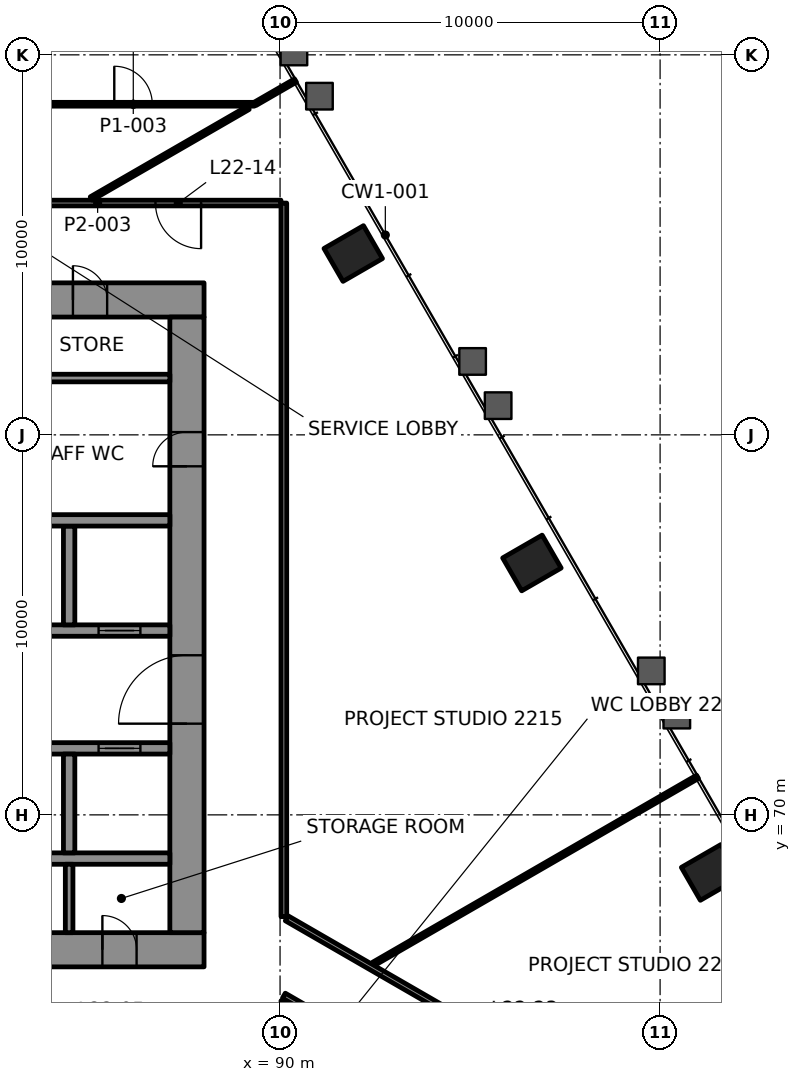
"""IFC4 building model, lengths in metres.
Left out: names, types, materials, properties, quantities, classifications, styles, units other than length and angle.
Written with IfcOpenShell. Run it as: python <this file> out.ifc"""

import sys

from ifc_helpers import new_model, si_unit, direction, frame, frame_2d, origin, origin_2d, place, context, subcontext, project, spatial, rectangle, extrude, element, fill, save


model = new_model("IFC4")
c1 = context("Model", 3, precision=1e-05, world=origin(), true_north=direction((0.0, 1.0)))
c2 = subcontext(c1, "Body", "Model", "MODEL_VIEW")
j1 = project(units=[si_unit("LENGTHUNIT", "METRE"), si_unit("PLANEANGLEUNIT", "RADIAN")], contexts=[c1])
p1 = place(None, origin())
s1 = spatial("IfcSite", under=j1, at=p1, CompositionType="ELEMENT")
p2 = place(p1, origin())
s2 = spatial("IfcBuilding", under=s1, at=p2, CompositionType="ELEMENT")
p3 = place(p2, frame((0.0, 0.0, 98.8)))
s3 = spatial("IfcBuildingStorey", under=s2, at=p3, CompositionType="ELEMENT", Elevation=98.8)
for number, where, z_axis, x_axis in (
    (1, (101.329, 68.485, -0.0), (0.0, 0.0, 1.0), (-0.5, 0.866, 0.0)),
    (2, (96.627, 76.628, -0.0), (0.0, 0.0, 1.0), (-0.5, 0.866, 0.0)),
    (3, (91.926, 84.772, -0.0), (0.0, 0.0, 1.0), (-0.5, 0.866, 0.0)),
):
    element("IfcColumn", number, at=place(p3, frame(where, z_axis=z_axis, x_axis=x_axis)), inside=s3, PredefinedType="COLUMN", context=c2, shape_type="SweptSolid", body=[
        extrude(rectangle(XDim=1.0, YDim=1.2, at=origin_2d()), origin(), (0.0, 0.0, 1.0), 4.2),
    ])
p4 = place(p3, frame((62.0, 66.45, 0.0), z_axis=(0.0, 0.0, 1.0), x_axis=(1.0, 0.0, 0.0)))
e4 = element("IfcWall", 4, at=p4, inside=s3, PredefinedType="SHEAR", context=c2, shape_type="SweptSolid", body=[
    extrude(rectangle(XDim=26.0, YDim=0.9, at=frame_2d((13.0, 0.0))), origin(), (0.0, 0.0, 1.0), 4.0),
])
p5 = place(p4, frame((3.45, 0.0, 0.0)))
e5 = element("IfcOpeningElement", 5, at=p5, cuts=e4, PredefinedType="OPENING", context=c2, shape_type="SweptSolid", body=[
    extrude(rectangle(XDim=0.9, YDim=2.1, at=frame_2d((0.45, 1.05))), frame((0.0, 0.46, 0.0), z_axis=(0.0, -1.0, 0.0), x_axis=(1.0, 0.0, 0.0)), (0.0, 0.0, 1.0), 0.92),
])
p6 = place(p4, frame((6.425, 0.0, 0.0)))
e6 = element("IfcOpeningElement", 6, at=p6, cuts=e4, PredefinedType="OPENING", context=c2, shape_type="SweptSolid", body=[
    extrude(rectangle(XDim=0.9, YDim=2.1, at=frame_2d((0.45, 1.05))), frame((0.0, 0.46, 0.0), z_axis=(0.0, -1.0, 0.0), x_axis=(1.0, 0.0, 0.0)), (0.0, 0.0, 1.0), 0.92),
])
p7 = place(p4, frame((11.5, 0.0, 0.0)))
e7 = element("IfcOpeningElement", 7, at=p7, cuts=e4, PredefinedType="OPENING", context=c2, shape_type="SweptSolid", body=[
    extrude(rectangle(XDim=0.9, YDim=2.1, at=frame_2d((0.45, 1.05))), frame((0.0, 0.46, 0.0), z_axis=(0.0, -1.0, 0.0), x_axis=(1.0, 0.0, 0.0)), (0.0, 0.0, 1.0), 0.92),
])
p8 = place(p4, frame((18.5, 0.0, 0.0)))
e8 = element("IfcOpeningElement", 8, at=p8, cuts=e4, PredefinedType="OPENING", context=c2, shape_type="SweptSolid", body=[
    extrude(rectangle(XDim=0.9, YDim=2.1, at=frame_2d((0.45, 1.05))), frame((0.0, 0.46, 0.0), z_axis=(0.0, -1.0, 0.0), x_axis=(1.0, 0.0, 0.0)), (0.0, 0.0, 1.0), 0.92),
])
p9 = place(p4, frame((23.325, 0.0, 0.0)))
e9 = element("IfcOpeningElement", 9, at=p9, cuts=e4, PredefinedType="OPENING", context=c2, shape_type="SweptSolid", body=[
    extrude(rectangle(XDim=0.9, YDim=2.1, at=frame_2d((0.45, 1.05))), frame((0.0, 0.46, 0.0), z_axis=(0.0, -1.0, 0.0), x_axis=(1.0, 0.0, 0.0)), (0.0, 0.0, 1.0), 0.92),
])
p10 = place(p3, frame((62.0, 83.55, 0.0), z_axis=(0.0, 0.0, 1.0), x_axis=(1.0, 0.0, 0.0)))
e10 = element("IfcWall", 10, at=p10, inside=s3, PredefinedType="SHEAR", context=c2, shape_type="SweptSolid", body=[
    extrude(rectangle(XDim=26.0, YDim=0.9, at=frame_2d((13.0, 0.0))), origin(), (0.0, 0.0, 1.0), 4.0),
])
p11 = place(p10, frame((5.695, 0.0, 0.0)))
e11 = element("IfcOpeningElement", 11, at=p11, cuts=e10, PredefinedType="OPENING", context=c2, shape_type="SweptSolid", body=[
    extrude(rectangle(XDim=1.0, YDim=2.1, at=frame_2d((0.5, 1.05))), frame((0.0, 0.46, 0.0), z_axis=(0.0, -1.0, 0.0), x_axis=(1.0, 0.0, 0.0)), (0.0, 0.0, 1.0), 0.92),
])
p12 = place(p10, frame((19.505, 0.0, 0.0)))
e12 = element("IfcOpeningElement", 12, at=p12, cuts=e10, PredefinedType="OPENING", context=c2, shape_type="SweptSolid", body=[
    extrude(rectangle(XDim=1.0, YDim=2.1, at=frame_2d((0.5, 1.05))), frame((0.0, 0.46, 0.0), z_axis=(0.0, -1.0, 0.0), x_axis=(1.0, 0.0, 0.0)), (0.0, 0.0, 1.0), 0.92),
])
p13 = place(p10, frame((3.45, 0.0, 0.0)))
e13 = element("IfcOpeningElement", 13, at=p13, cuts=e10, PredefinedType="OPENING", context=c2, shape_type="SweptSolid", body=[
    extrude(rectangle(XDim=0.9, YDim=2.1, at=frame_2d((0.45, 1.05))), frame((0.0, 0.46, 0.0), z_axis=(0.0, -1.0, 0.0), x_axis=(1.0, 0.0, 0.0)), (0.0, 0.0, 1.0), 0.92),
])
p14 = place(p10, frame((12.65, 0.0, 0.0)))
e14 = element("IfcOpeningElement", 14, at=p14, cuts=e10, PredefinedType="OPENING", context=c2, shape_type="SweptSolid", body=[
    extrude(rectangle(XDim=0.9, YDim=2.1, at=frame_2d((0.45, 1.05))), frame((0.0, 0.46, 0.0), z_axis=(0.0, -1.0, 0.0), x_axis=(1.0, 0.0, 0.0)), (0.0, 0.0, 1.0), 0.92),
])
p15 = place(p10, frame((22.55, 0.0, 0.0)))
e15 = element("IfcOpeningElement", 15, at=p15, cuts=e10, PredefinedType="OPENING", context=c2, shape_type="SweptSolid", body=[
    extrude(rectangle(XDim=0.9, YDim=2.1, at=frame_2d((0.45, 1.05))), frame((0.0, 0.46, 0.0), z_axis=(0.0, -1.0, 0.0), x_axis=(1.0, 0.0, 0.0)), (0.0, 0.0, 1.0), 0.92),
])
p16 = place(p3, frame((87.55, 66.9, 0.0), z_axis=(0.0, 0.0, 1.0), x_axis=(0.0, 1.0, 0.0)))
e16 = element("IfcWall", 16, at=p16, inside=s3, PredefinedType="SHEAR", context=c2, shape_type="SweptSolid", body=[
    extrude(rectangle(XDim=16.2, YDim=0.9, at=frame_2d((8.1, 0.0))), origin(), (0.0, 0.0, 1.0), 4.0),
])
p17 = place(p16, frame((5.5, 0.0, 0.0)))
e17 = element("IfcOpeningElement", 17, at=p17, cuts=e16, PredefinedType="OPENING", context=c2, shape_type="SweptSolid", body=[
    extrude(rectangle(XDim=1.8, YDim=2.1, at=frame_2d((0.9, 1.05))), frame((0.0, 0.46, 0.0), z_axis=(0.0, -1.0, 0.0), x_axis=(1.0, 0.0, 0.0)), (0.0, 0.0, 1.0), 0.92),
])
p18 = place(p16, frame((12.272, 0.0, 0.0)))
e18 = element("IfcOpeningElement", 18, at=p18, cuts=e16, PredefinedType="OPENING", context=c2, shape_type="SweptSolid", body=[
    extrude(rectangle(XDim=0.9, YDim=2.1, at=frame_2d((0.45, 1.05))), frame((0.0, 0.46, 0.0), z_axis=(0.0, -1.0, 0.0), x_axis=(1.0, 0.0, 0.0)), (0.0, 0.0, 1.0), 0.92),
])
p19 = place(p3, frame((70.35, 68.85, 0.0), z_axis=(0.0, 0.0, 1.0), x_axis=(1.0, 0.0, 0.0)))
e19 = element("IfcWall", 19, at=p19, inside=s3, PredefinedType="SHEAR", context=c2, shape_type="SweptSolid", body=[
    extrude(rectangle(XDim=16.75, YDim=0.3, at=frame_2d((8.375, 0.0))), origin(), (0.0, 0.0, 1.0), 4.0),
])
p20 = place(p3, frame((70.3, 71.75, 0.0), z_axis=(0.0, 0.0, 1.0), x_axis=(1.0, 0.0, 0.0)))
e20 = element("IfcWall", 20, at=p20, inside=s3, PredefinedType="SHEAR", context=c2, shape_type="SweptSolid", body=[
    extrude(rectangle(XDim=16.8, YDim=0.3, at=frame_2d((8.4, 0.0))), origin(), (0.0, 0.0, 1.0), 4.0),
])
p21 = place(p20, frame((1.0, 0.0, 0.0)))
e21 = element("IfcOpeningElement", 21, at=p21, cuts=e20, PredefinedType="OPENING", context=c2, shape_type="SweptSolid", body=[
    extrude(rectangle(XDim=1.1, YDim=2.1, at=frame_2d((0.55, 1.05))), frame((0.0, 0.16, 0.0), z_axis=(0.0, -1.0, 0.0), x_axis=(1.0, 0.0, 0.0)), (0.0, 0.0, 1.0), 0.32),
])
p22 = place(p20, frame((3.8, 0.0, 0.0)))
e22 = element("IfcOpeningElement", 22, at=p22, cuts=e20, PredefinedType="OPENING", context=c2, shape_type="SweptSolid", body=[
    extrude(rectangle(XDim=1.1, YDim=2.1, at=frame_2d((0.55, 1.05))), frame((0.0, 0.16, 0.0), z_axis=(0.0, -1.0, 0.0), x_axis=(1.0, 0.0, 0.0)), (0.0, 0.0, 1.0), 0.32),
])
p23 = place(p20, frame((6.6, 0.0, 0.0)))
e23 = element("IfcOpeningElement", 23, at=p23, cuts=e20, PredefinedType="OPENING", context=c2, shape_type="SweptSolid", body=[
    extrude(rectangle(XDim=1.1, YDim=2.1, at=frame_2d((0.55, 1.05))), frame((0.0, 0.16, 0.0), z_axis=(0.0, -1.0, 0.0), x_axis=(1.0, 0.0, 0.0)), (0.0, 0.0, 1.0), 0.32),
])
p24 = place(p20, frame((9.4, 0.0, 0.0)))
e24 = element("IfcOpeningElement", 24, at=p24, cuts=e20, PredefinedType="OPENING", context=c2, shape_type="SweptSolid", body=[
    extrude(rectangle(XDim=1.1, YDim=2.1, at=frame_2d((0.55, 1.05))), frame((0.0, 0.16, 0.0), z_axis=(0.0, -1.0, 0.0), x_axis=(1.0, 0.0, 0.0)), (0.0, 0.0, 1.0), 0.32),
])
p25 = place(p20, frame((12.2, 0.0, 0.0)))
e25 = element("IfcOpeningElement", 25, at=p25, cuts=e20, PredefinedType="OPENING", context=c2, shape_type="SweptSolid", body=[
    extrude(rectangle(XDim=1.1, YDim=2.1, at=frame_2d((0.55, 1.05))), frame((0.0, 0.16, 0.0), z_axis=(0.0, -1.0, 0.0), x_axis=(1.0, 0.0, 0.0)), (0.0, 0.0, 1.0), 0.32),
])
p26 = place(p20, frame((14.925, 0.0, 0.0)))
e26 = element("IfcOpeningElement", 26, at=p26, cuts=e20, PredefinedType="OPENING", context=c2, shape_type="SweptSolid", body=[
    extrude(rectangle(XDim=1.1, YDim=2.1, at=frame_2d((0.55, 1.05))), frame((0.0, 0.16, 0.0), z_axis=(0.0, -1.0, 0.0), x_axis=(1.0, 0.0, 0.0)), (0.0, 0.0, 1.0), 0.32),
])
p27 = place(p3, frame((70.3, 74.85, 0.0), z_axis=(0.0, 0.0, 1.0), x_axis=(1.0, 0.0, 0.0)))
e27 = element("IfcWall", 27, at=p27, inside=s3, PredefinedType="SHEAR", context=c2, shape_type="SweptSolid", body=[
    extrude(rectangle(XDim=16.8, YDim=0.3, at=frame_2d((8.4, 0.0))), origin(), (0.0, 0.0, 1.0), 4.0),
])
p28 = place(p27, frame((3.8, 0.0, 0.0)))
e28 = element("IfcOpeningElement", 28, at=p28, cuts=e27, PredefinedType="OPENING", context=c2, shape_type="SweptSolid", body=[
    extrude(rectangle(XDim=1.1, YDim=2.1, at=frame_2d((0.55, 1.05))), frame((0.0, 0.16, 0.0), z_axis=(0.0, -1.0, 0.0), x_axis=(1.0, 0.0, 0.0)), (0.0, 0.0, 1.0), 0.32),
])
p29 = place(p27, frame((12.2, 0.0, 0.0)))
e29 = element("IfcOpeningElement", 29, at=p29, cuts=e27, PredefinedType="OPENING", context=c2, shape_type="SweptSolid", body=[
    extrude(rectangle(XDim=1.1, YDim=2.1, at=frame_2d((0.55, 1.05))), frame((0.0, 0.16, 0.0), z_axis=(0.0, -1.0, 0.0), x_axis=(1.0, 0.0, 0.0)), (0.0, 0.0, 1.0), 0.32),
])
p30 = place(p27, frame((14.925, 0.0, 0.0)))
e30 = element("IfcOpeningElement", 30, at=p30, cuts=e27, PredefinedType="OPENING", context=c2, shape_type="SweptSolid", body=[
    extrude(rectangle(XDim=1.1, YDim=2.1, at=frame_2d((0.55, 1.05))), frame((0.0, 0.16, 0.0), z_axis=(0.0, -1.0, 0.0), x_axis=(1.0, 0.0, 0.0)), (0.0, 0.0, 1.0), 0.32),
])
for number, where, z_axis, x_axis in (
    (31, (84.45, 69.0, 0.0), (0.0, 0.0, 1.0), (0.0, 1.0, 0.0)),
    (32, (84.45, 75.0, 0.0), (0.0, 0.0, 1.0), (0.0, 1.0, 0.0)),
):
    element("IfcWall", number, at=place(p3, frame(where, z_axis=z_axis, x_axis=x_axis)), inside=s3, PredefinedType="SHEAR", context=c2, shape_type="SweptSolid", body=[
        extrude(rectangle(XDim=2.6, YDim=0.3, at=frame_2d((1.3, 0.0))), origin(), (0.0, 0.0, 1.0), 4.0),
    ])
p31 = place(p3, frame((64.35, 77.75, 0.0), z_axis=(0.0, 0.0, 1.0), x_axis=(1.0, 0.0, 0.0)))
e33 = element("IfcWall", 33, at=p31, inside=s3, PredefinedType="SHEAR", context=c2, shape_type="SweptSolid", body=[
    extrude(rectangle(XDim=22.75, YDim=0.3, at=frame_2d((11.375, 0.0))), origin(), (0.0, 0.0, 1.0), 4.0),
])
p32 = place(p31, frame((3.345, 0.0, 0.0)))
e34 = element("IfcOpeningElement", 34, at=p32, cuts=e33, PredefinedType="OPENING", context=c2, shape_type="SweptSolid", body=[
    extrude(rectangle(XDim=1.0, YDim=2.1, at=frame_2d((0.5, 1.05))), frame((0.0, 0.16, 0.0), z_axis=(0.0, -1.0, 0.0), x_axis=(1.0, 0.0, 0.0)), (0.0, 0.0, 1.0), 0.32),
])
p33 = place(p3, frame((90.024, 86.1, 0.0), z_axis=(0.0, 0.0, 1.0), x_axis=(-1.0, 0.0, 0.0)))
e35 = element("IfcWall", 35, at=p33, inside=s3, PredefinedType="PARTITIONING", context=c2, shape_type="SweptSolid", body=[
    extrude(rectangle(XDim=9.649, YDim=0.15, at=frame_2d((4.825, 0.0))), origin(), (0.0, 0.0, 1.0), 3.4),
])
p34 = place(p33, frame((2.103, 0.0, 0.0)))
e36 = element("IfcOpeningElement", 36, at=p34, cuts=e35, PredefinedType="OPENING", context=c2, shape_type="SweptSolid", body=[
    extrude(rectangle(XDim=1.2, YDim=2.1, at=frame_2d((0.6, 1.05))), frame((0.0, 0.085, 0.0), z_axis=(0.0, -1.0, 0.0), x_axis=(1.0, 0.0, 0.0)), (0.0, 0.0, 1.0), 0.17),
])
p35 = place(p33, frame((6.823, 0.0, 0.0)))
e37 = element("IfcOpeningElement", 37, at=p35, cuts=e35, PredefinedType="OPENING", context=c2, shape_type="SweptSolid", body=[
    extrude(rectangle(XDim=1.0, YDim=2.1, at=frame_2d((0.5, 1.05))), frame((0.0, 0.085, 0.0), z_axis=(0.0, -1.0, 0.0), x_axis=(1.0, 0.0, 0.0)), (0.0, 0.0, 1.0), 0.17),
])
p36 = place(p3, frame((82.95, 88.7, 0.0), z_axis=(0.0, 0.0, 1.0), x_axis=(1.0, 0.0, 0.0)))
e38 = element("IfcWall", 38, at=p36, inside=s3, PredefinedType="PARTITIONING", context=c2, shape_type="SweptSolid", body=[
    extrude(rectangle(XDim=6.376, YDim=0.1, at=frame_2d((3.188, 0.0))), origin(), (0.0, 0.0, 1.0), 3.4),
])
p37 = place(p36, frame((2.688, 0.0, 0.0)))
e39 = element("IfcOpeningElement", 39, at=p37, cuts=e38, PredefinedType="OPENING", context=c2, shape_type="SweptSolid", body=[
    extrude(rectangle(XDim=1.0, YDim=2.1, at=frame_2d((0.5, 1.05))), frame((0.0, 0.06, 0.0), z_axis=(0.0, -1.0, 0.0), x_axis=(1.0, 0.0, 0.0)), (0.0, 0.0, 1.0), 0.12),
])
p38 = place(p3, frame((92.457, 66.077, 0.0), z_axis=(0.0, 0.0, 1.0), x_axis=(0.866029936849, 0.499992148419, 0.0)))
e40 = element("IfcWall", 40, at=p38, inside=s3, PredefinedType="PARTITIONING", context=c2, shape_type="SweptSolid", body=[
    extrude(rectangle(XDim=9.847, YDim=0.1, at=frame_2d((4.924, 0.0))), origin(), (0.0, 0.0, 1.0), 3.165),
])
p39 = place(p3, frame((85.03, 86.22, 0.0), z_axis=(0.0, 0.0, 1.0), x_axis=(0.86602800421, 0.499995495904, 0.0)))
e41 = element("IfcWall", 41, at=p39, inside=s3, PredefinedType="PARTITIONING", context=c2, shape_type="SweptSolid", body=[
    extrude(rectangle(XDim=4.773, YDim=0.1, at=frame_2d((2.386, 0.0))), origin(), (0.0, 0.0, 1.0), 3.4),
])
p40 = place(p3, frame((90.1, 63.975, 0.0), z_axis=(0.0, 0.0, 1.0), x_axis=(0.0, 1.0, 0.0)))
e42 = element("IfcWall", 42, at=p40, inside=s3, PredefinedType="PARTITIONING", context=c2, shape_type="SweptSolid", body=[
    extrude(rectangle(XDim=1.131, YDim=0.15, at=frame_2d((0.565, 0.0))), origin(), (0.0, 0.0, 1.0), 3.247),
])
p41 = place(p3, frame((90.1, 67.321, 0.0), z_axis=(0.0, 0.0, 1.0), x_axis=(0.0, 1.0, 0.0)))
e43 = element("IfcWall", 43, at=p41, inside=s3, PredefinedType="PARTITIONING", context=c2, shape_type="SweptSolid", body=[
    extrude(rectangle(XDim=18.778, YDim=0.15, at=frame_2d((9.389, 0.0))), origin(), (0.0, 0.0, 1.0), 3.4),
])
p42 = place(p3, frame((90.175, 67.278, 0.0), z_axis=(0.0, 0.0, 1.0), x_axis=(0.866020657332, -0.500008221008, 0.0)))
e44 = element("IfcWall", 44, at=p42, inside=s3, PredefinedType="PARTITIONING", context=c2, shape_type="SweptSolid", body=[
    extrude(rectangle(XDim=14.15, YDim=0.15, at=frame_2d((7.075, 0.0))), origin(), (0.0, 0.0, 1.0), 3.4),
])
p43 = place(p42, frame((7.782, 0.0, 0.0)))
e45 = element("IfcOpeningElement", 45, at=p43, cuts=e44, PredefinedType="OPENING", context=c2, shape_type="SweptSolid", body=[
    extrude(rectangle(XDim=0.9, YDim=2.1, at=frame_2d((0.45, 1.05))), frame((0.0, 0.085, 0.0), z_axis=(0.0, -1.0, 0.0), x_axis=(1.0, 0.0, 0.0)), (0.0, 0.0, 1.0), 0.17),
])
p44 = place(p3, frame((101.529, 58.645, 0.0), z_axis=(0.0, 0.0, 1.0), x_axis=(-0.866020144196, 0.500009109764, 0.0)))
e46 = element("IfcWall", 46, at=p44, inside=s3, PredefinedType="PARTITIONING", context=c2, shape_type="SweptSolid", body=[
    extrude(rectangle(XDim=13.197, YDim=0.15, at=frame_2d((6.598, 0.0))), origin(), (0.0, 0.0, 1.0), 3.247),
])
p45 = place(p44, frame((5.467, 0.0, 0.0)))
e47 = element("IfcOpeningElement", 47, at=p45, cuts=e46, PredefinedType="OPENING", context=c2, shape_type="SweptSolid", body=[
    extrude(rectangle(XDim=0.9, YDim=2.1, at=frame_2d((0.45, 1.05))), frame((0.0, 0.085, 0.0), z_axis=(0.0, -1.0, 0.0), x_axis=(1.0, 0.0, 0.0)), (0.0, 0.0, 1.0), 0.17),
])
p46 = place(p3, frame((89.347, 88.713, 0.0), z_axis=(0.0, 0.0, 1.0), x_axis=(0.866109108303, 0.499854991488, 0.0)))
e48 = element("IfcWall", 48, at=p46, inside=s3, PredefinedType="PARTITIONING", context=c2, shape_type="SweptSolid", body=[
    extrude(rectangle(XDim=1.222, YDim=0.1, at=frame_2d((0.611, 0.0))), origin(), (0.0, 0.0, 1.0), 3.165),
])
p47 = place(p3, frame((83.0, 81.495, 0.0), z_axis=(0.0, 0.0, 1.0), x_axis=(1.0, 0.0, 0.0)))
e49 = element("IfcWall", 49, at=p47, inside=s3, PredefinedType="PARTITIONING", context=c2, shape_type="SweptSolid", body=[
    extrude(rectangle(XDim=4.1, YDim=0.2, at=frame_2d((2.05, 0.0))), origin(), (0.0, 0.0, 1.0), 4.0),
])
p48 = place(p3, frame((84.45, 66.9, 0.0), z_axis=(0.0, 0.0, 1.0), x_axis=(0.0, 1.0, 0.0)))
e50 = element("IfcWall", 50, at=p48, inside=s3, PredefinedType="PARTITIONING", context=c2, shape_type="SweptSolid", body=[
    extrude(rectangle(XDim=1.8, YDim=0.2, at=frame_2d((0.9, 0.0))), origin(), (0.0, 0.0, 1.0), 4.0),
])
p49 = place(p34, origin())
e51 = element("IfcDoor", 51, at=p49, inside=s3, OperationType="DOUBLE_DOOR_SINGLE_SWING", PredefinedType="DOOR", context=c2, shape_type="SweptSolid", body=[
    extrude(rectangle(XDim=1.2, YDim=2.1, at=frame_2d((0.6, 1.05))), frame((0.0, 0.025, 0.0), z_axis=(0.0, -1.0, 0.0), x_axis=(1.0, 0.0, 0.0)), (0.0, 0.0, 1.0), 0.05),
])
fill(e36, e51)
p50 = place(p37, origin())
e52 = element("IfcDoor", 52, at=p50, inside=s3, OperationType="SINGLE_SWING_LEFT", PredefinedType="DOOR", context=c2, shape_type="SweptSolid", body=[
    extrude(rectangle(XDim=1.0, YDim=2.1, at=frame_2d((0.5, 1.05))), frame((0.0, 0.025, 0.0), z_axis=(0.0, -1.0, 0.0), x_axis=(1.0, 0.0, 0.0)), (0.0, 0.0, 1.0), 0.05),
])
fill(e39, e52)
p51 = place(p26, origin())
e53 = element("IfcDoor", 53, at=p51, inside=s3, OperationType="DOUBLE_DOOR_SLIDING", PredefinedType="DOOR", context=c2, shape_type="SweptSolid", body=[
    extrude(rectangle(XDim=1.1, YDim=2.1, at=frame_2d((0.55, 1.05))), frame((0.0, 0.025, 0.0), z_axis=(0.0, -1.0, 0.0), x_axis=(1.0, 0.0, 0.0)), (0.0, 0.0, 1.0), 0.05),
])
fill(e26, e53)
p52 = place(p30, origin())
e54 = element("IfcDoor", 54, at=p52, inside=s3, OperationType="DOUBLE_DOOR_SLIDING", PredefinedType="DOOR", context=c2, shape_type="SweptSolid", body=[
    extrude(rectangle(XDim=1.1, YDim=2.1, at=frame_2d((0.55, 1.05))), frame((0.0, 0.025, 0.0), z_axis=(0.0, -1.0, 0.0), x_axis=(1.0, 0.0, 0.0)), (0.0, 0.0, 1.0), 0.05),
])
fill(e30, e54)
p53 = place(p17, origin())
e55 = element("IfcDoor", 55, at=p53, inside=s3, OperationType="SINGLE_SWING_RIGHT", PredefinedType="DOOR", context=c2, shape_type="SweptSolid", body=[
    extrude(rectangle(XDim=1.8, YDim=2.1, at=frame_2d((0.9, 1.05))), frame((0.0, 0.17, 0.0), z_axis=(0.0, -1.0, 0.0), x_axis=(1.0, 0.0, 0.0)), (0.0, 0.0, 1.0), 0.34),
])
fill(e17, e55)
p54 = place(p9, origin())
e56 = element("IfcDoor", 56, at=p54, inside=s3, OperationType="SINGLE_SWING_LEFT", PredefinedType="DOOR", context=c2, shape_type="SweptSolid", body=[
    extrude(rectangle(XDim=0.9, YDim=2.1, at=frame_2d((0.45, 1.05))), frame((0.0, 0.17, 0.0), z_axis=(0.0, -1.0, 0.0), x_axis=(1.0, 0.0, 0.0)), (0.0, 0.0, 1.0), 0.34),
])
fill(e9, e56)
p55 = place(p18, origin())
e57 = element("IfcDoor", 57, at=p55, inside=s3, OperationType="SINGLE_SWING_RIGHT", PredefinedType="DOOR", context=c2, shape_type="SweptSolid", body=[
    extrude(rectangle(XDim=0.9, YDim=2.1, at=frame_2d((0.45, 1.05))), frame((0.0, 0.17, 0.0), z_axis=(0.0, -1.0, 0.0), x_axis=(1.0, 0.0, 0.0)), (0.0, 0.0, 1.0), 0.34),
])
fill(e18, e57)
p56 = place(p15, origin())
e58 = element("IfcDoor", 58, at=p56, inside=s3, OperationType="SINGLE_SWING_LEFT", PredefinedType="DOOR", context=c2, shape_type="SweptSolid", body=[
    extrude(rectangle(XDim=0.9, YDim=2.1, at=frame_2d((0.45, 1.05))), frame((0.0, 0.17, 0.0), z_axis=(0.0, -1.0, 0.0), x_axis=(1.0, 0.0, 0.0)), (0.0, 0.0, 1.0), 0.34),
])
fill(e15, e58)
save(model, sys.argv[1])
